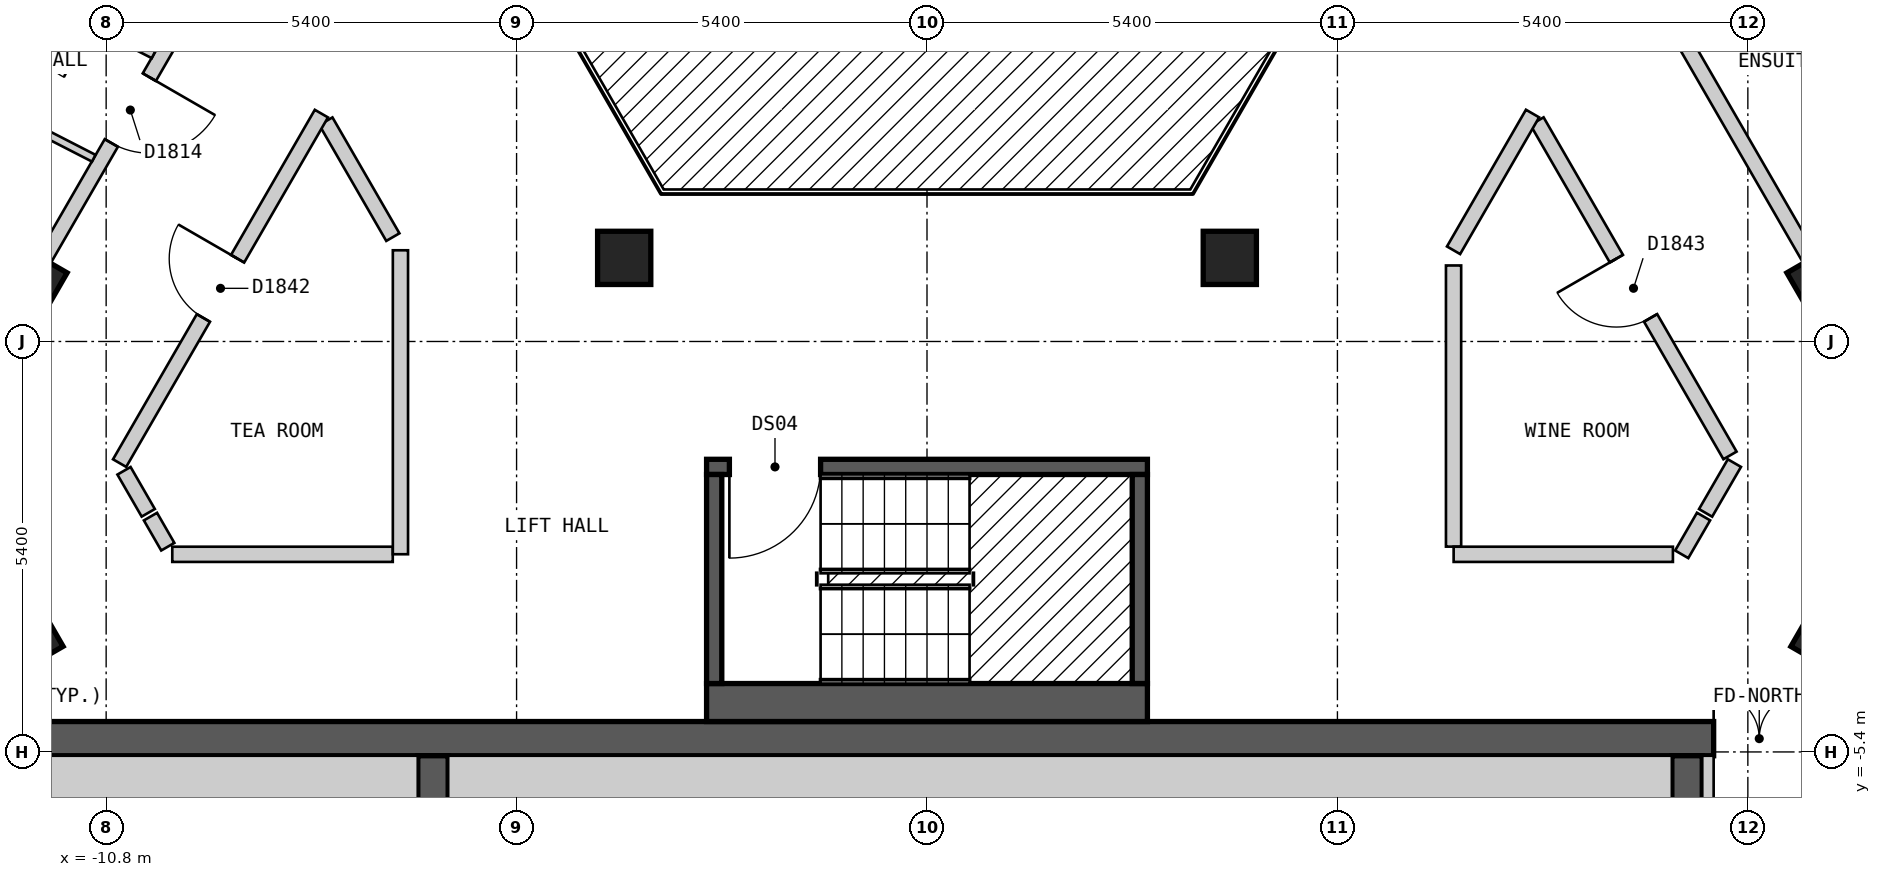
"""IFC4 building model, lengths in metres.
Left out: names, types, materials, properties, quantities, classifications, styles, units other than length and angle.
Written with IfcOpenShell. Run it as: python <this file> out.ifc"""

import sys

from ifc_helpers import new_model, si_unit, direction, frame, frame_2d, origin, origin_2d, place, context, subcontext, project, spatial, rectangle, extrude, element, fill, save


model = new_model("IFC4")
c1 = context("Model", 3, precision=1e-05, world=origin(), true_north=direction((0.0, 1.0)))
c2 = subcontext(c1, "Body", "Model", "MODEL_VIEW")
j1 = project(units=[si_unit("LENGTHUNIT", "METRE"), si_unit("PLANEANGLEUNIT", "RADIAN")], contexts=[c1])
p1 = place(None, origin())
s1 = spatial("IfcSite", under=j1, at=p1, CompositionType="ELEMENT")
p2 = place(p1, origin())
s2 = spatial("IfcBuilding", under=s1, at=p2, CompositionType="ELEMENT")
p3 = place(p2, frame((0.0, 0.0, 208.8)))
s3 = spatial("IfcBuildingStorey", under=s2, at=p3, CompositionType="ELEMENT", Elevation=208.8)
for number, where, z_axis, x_axis in (
    (1, (-11.845, -3.883, 0.0), (0.0, 0.0, 1.0), (0.5, -0.866, 0.0)),
    (2, (11.845, -3.884, 0.0), (0.0, 0.0, 1.0), (0.5, 0.866, 0.0)),
    (3, (11.792, 0.775, 0.0), (0.0, 0.0, 1.0), (-0.5, 0.866, 0.0)),
    (4, (3.984, 1.1, 0.0), (0.0, 0.0, 1.0), (1.0, 0.0, 0.0)),
    (5, (-3.984, 1.1, 0.0), (0.0, 0.0, 1.0), (1.0, 0.0, 0.0)),
    (6, (-11.792, 0.775, 0.0), (0.0, 0.0, 1.0), (-0.5, -0.866, 0.0)),
):
    element("IfcColumn", number, at=place(p3, frame(where, z_axis=z_axis, x_axis=x_axis)), inside=s3, PredefinedType="COLUMN", context=c2, shape_type="SweptSolid", body=[
        extrude(rectangle(XDim=0.7, YDim=0.7, at=origin_2d()), origin(), (0.0, 0.0, 1.0), 3.0),
    ])
p4 = place(p3, frame((-13.3, -5.225, 0.0), z_axis=(0.0, 0.0, 1.0), x_axis=(1.0, 0.0, 0.0)))
e7 = element("IfcWall", 7, at=p4, inside=s3, PredefinedType="SHEAR", context=c2, shape_type="SweptSolid", body=[
    extrude(rectangle(XDim=26.6, YDim=0.45, at=frame_2d((13.3, 0.0))), origin(), (0.0, 0.0, 1.0), 2.7),
])
p5 = place(p4, frame((23.65, 0.0, 0.0)))
e8 = element("IfcOpeningElement", 8, at=p5, cuts=e7, PredefinedType="OPENING", context=c2, shape_type="SweptSolid", body=[
    extrude(rectangle(XDim=1.2, YDim=2.1, at=frame_2d((0.6, 1.05))), frame((0.0, 0.235, 0.0), z_axis=(0.0, -1.0, 0.0), x_axis=(1.0, 0.0, 0.0)), (0.0, 0.0, 1.0), 0.47),
])
for number, where, z_axis, x_axis in (
    (9, (-6.5, -9.15, 0.0), (0.0, 0.0, 1.0), (0.0, 1.0, 0.0)),
    (10, (10.0, -9.15, 0.0), (0.0, 0.0, 1.0), (0.0, 1.0, 0.0)),
):
    element("IfcWall", number, at=place(p3, frame(where, z_axis=z_axis, x_axis=x_axis)), inside=s3, PredefinedType="SHEAR", context=c2, shape_type="SweptSolid", body=[
        extrude(rectangle(XDim=3.7, YDim=0.4, at=frame_2d((1.85, 0.0))), origin(), (0.0, 0.0, 1.0), 2.7),
    ])
p6 = place(p3, frame((-2.9, -4.75, 0.0), z_axis=(0.0, 0.0, 1.0), x_axis=(1.0, 0.0, 0.0)))
e11 = element("IfcWall", 11, at=p6, inside=s3, PredefinedType="SOLIDWALL", context=c2, shape_type="SweptSolid", body=[
    extrude(rectangle(XDim=5.8, YDim=0.5, at=frame_2d((2.9, 0.0))), origin(), (0.0, 0.0, 1.0), 2.7),
])
p7 = place(p3, frame((-2.9, -1.65, 0.0), z_axis=(0.0, 0.0, 1.0), x_axis=(1.0, 0.0, 0.0)))
e12 = element("IfcWall", 12, at=p7, inside=s3, PredefinedType="SOLIDWALL", context=c2, shape_type="SweptSolid", body=[
    extrude(rectangle(XDim=5.8, YDim=0.2, at=frame_2d((2.9, 0.0))), origin(), (0.0, 0.0, 1.0), 2.7),
])
p8 = place(p7, frame((0.3, 0.0, 0.0)))
e13 = element("IfcOpeningElement", 13, at=p8, cuts=e12, PredefinedType="OPENING", context=c2, shape_type="SweptSolid", body=[
    extrude(rectangle(XDim=1.2, YDim=2.1, at=frame_2d((0.6, 1.05))), frame((0.0, 0.11, 0.0), z_axis=(0.0, -1.0, 0.0), x_axis=(1.0, 0.0, 0.0)), (0.0, 0.0, 1.0), 0.22),
])
for number, where, z_axis, x_axis in (
    (14, (-2.8, -4.5, 0.0), (0.0, 0.0, 1.0), (0.0, 1.0, 0.0)),
    (15, (2.8, -4.5, 0.0), (0.0, 0.0, 1.0), (0.0, 1.0, 0.0)),
):
    element("IfcWall", number, at=place(p3, frame(where, z_axis=z_axis, x_axis=x_axis)), inside=s3, PredefinedType="SOLIDWALL", context=c2, shape_type="SweptSolid", body=[
        extrude(rectangle(XDim=2.75, YDim=0.2, at=frame_2d((1.375, 0.0))), origin(), (0.0, 0.0, 1.0), 2.7),
    ])
p9 = place(p3, frame((-7.909, 2.898, 0.0), z_axis=(0.0, 0.0, 1.0), x_axis=(0.50019444547, -0.865913111531, 0.0)))
e16 = element("IfcWall", 16, at=p9, inside=s3, PredefinedType="PARTITIONING", context=c2, shape_type="SweptSolid", body=[
    extrude(rectangle(XDim=1.761, YDim=0.2, at=frame_2d((0.88, 0.0))), origin(), (0.0, 0.0, 1.0), 2.7),
])
p10 = place(p3, frame((-10.565, -1.701, 0.0), z_axis=(0.0, 0.0, 1.0), x_axis=(0.499512735409, -0.866306543416, 0.0)))
e17 = element("IfcWall", 17, at=p10, inside=s3, PredefinedType="PARTITIONING", context=c2, shape_type="SweptSolid", body=[
    extrude(rectangle(XDim=0.638, YDim=0.2, at=frame_2d((0.319, 0.0))), origin(), (0.0, 0.0, 1.0), 2.7),
])
p11 = place(p3, frame((-10.217, -2.304, 0.0), z_axis=(0.0, 0.0, 1.0), x_axis=(0.499013081552, -0.866594452117, 0.0)))
e18 = element("IfcWall", 18, at=p11, inside=s3, PredefinedType="PARTITIONING", context=c2, shape_type="SweptSolid", body=[
    extrude(rectangle(XDim=0.457, YDim=0.2, at=frame_2d((0.229, 0.0))), origin(), (0.0, 0.0, 1.0), 2.7),
])
p12 = place(p3, frame((8.026, 2.899, 0.0), z_axis=(0.0, 0.0, 1.0), x_axis=(0.499986018985, -0.866033475577, 0.0)))
e19 = element("IfcWall", 19, at=p12, inside=s3, PredefinedType="PARTITIONING", context=c2, shape_type="SweptSolid", body=[
    extrude(rectangle(XDim=5.078, YDim=0.2, at=frame_2d((2.539, 0.0))), origin(), (0.0, 0.0, 1.0), 2.7),
])
p13 = place(p12, frame((2.089, 0.0, 0.0)))
e20 = element("IfcOpeningElement", 20, at=p13, cuts=e19, PredefinedType="OPENING", context=c2, shape_type="SweptSolid", body=[
    extrude(rectangle(XDim=0.9, YDim=2.1, at=frame_2d((0.45, 1.05))), frame((0.0, 0.11, 0.0), z_axis=(0.0, -1.0, 0.0), x_axis=(1.0, 0.0, 0.0)), (0.0, 0.0, 1.0), 0.22),
])
p14 = place(p3, frame((9.238, 5.2, 0.0), z_axis=(0.0, 0.0, 1.0), x_axis=(0.500025705601, -0.86601056214, 0.0)))
e21 = element("IfcWall", 21, at=p14, inside=s3, PredefinedType="PARTITIONING", context=c2, shape_type="SweptSolid", body=[
    extrude(rectangle(XDim=7.735, YDim=0.2, at=frame_2d((3.868, 0.0))), origin(), (0.0, 0.0, 1.0), 2.7),
])
p15 = place(p3, frame((6.928, 1.0, 0.0), z_axis=(0.0, 0.0, 1.0), x_axis=(0.0, -1.0, 0.0)))
e22 = element("IfcWall", 22, at=p15, inside=s3, PredefinedType="PARTITIONING", context=c2, shape_type="SweptSolid", body=[
    extrude(rectangle(XDim=3.699, YDim=0.2, at=frame_2d((1.85, 0.0))), origin(), (0.0, 0.0, 1.0), 2.7),
])
p16 = place(p3, frame((-9.93, -2.8, 0.0), z_axis=(0.0, 0.0, 1.0), x_axis=(1.0, 0.0, 0.0)))
e23 = element("IfcWall", 23, at=p16, inside=s3, PredefinedType="PARTITIONING", context=c2, shape_type="SweptSolid", body=[
    extrude(rectangle(XDim=2.901, YDim=0.2, at=frame_2d((1.45, 0.0))), origin(), (0.0, 0.0, 1.0), 2.7),
])
p17 = place(p3, frame((6.929, -2.8, 0.0), z_axis=(0.0, 0.0, 1.0), x_axis=(1.0, 0.0, 0.0)))
e24 = element("IfcWall", 24, at=p17, inside=s3, PredefinedType="PARTITIONING", context=c2, shape_type="SweptSolid", body=[
    extrude(rectangle(XDim=2.885, YDim=0.2, at=frame_2d((1.442, 0.0))), origin(), (0.0, 0.0, 1.0), 2.7),
])
p18 = place(p3, frame((6.928, 1.2, 0.0), z_axis=(0.0, 0.0, 1.0), x_axis=(0.500132712588, 0.865948768577, 0.0)))
e25 = element("IfcWall", 25, at=p18, inside=s3, PredefinedType="PARTITIONING", context=c2, shape_type="SweptSolid", body=[
    extrude(rectangle(XDim=2.078, YDim=0.2, at=frame_2d((1.039, 0.0))), origin(), (0.0, 0.0, 1.0), 2.7),
])
p19 = place(p3, frame((9.93, -2.8, 0.0), z_axis=(0.0, 0.0, 1.0), x_axis=(0.500164219654, 0.865930570761, 0.0)))
e26 = element("IfcWall", 26, at=p19, inside=s3, PredefinedType="PARTITIONING", context=c2, shape_type="SweptSolid", body=[
    extrude(rectangle(XDim=0.574, YDim=0.2, at=frame_2d((0.287, 0.0))), origin(), (0.0, 0.0, 1.0), 2.7),
])
p20 = place(p3, frame((10.244, -2.255, 0.0), z_axis=(0.0, 0.0, 1.0), x_axis=(0.50109986513, 0.865389464442, 0.0)))
e27 = element("IfcWall", 27, at=p20, inside=s3, PredefinedType="PARTITIONING", context=c2, shape_type="SweptSolid", body=[
    extrude(rectangle(XDim=0.757, YDim=0.2, at=frame_2d((0.378, 0.0))), origin(), (0.0, 0.0, 1.0), 2.7),
])
p21 = place(p3, frame((-10.623, -1.6, 0.0), z_axis=(0.0, 0.0, 1.0), x_axis=(0.500040865889, 0.866001808567, 0.0)))
e28 = element("IfcWall", 28, at=p21, inside=s3, PredefinedType="PARTITIONING", context=c2, shape_type="SweptSolid", body=[
    extrude(rectangle(XDim=5.31, YDim=0.2, at=frame_2d((2.655, 0.0))), origin(), (0.0, 0.0, 1.0), 2.7),
])
p22 = place(p21, frame((2.205, 0.0, 0.0)))
e29 = element("IfcOpeningElement", 29, at=p22, cuts=e28, PredefinedType="OPENING", context=c2, shape_type="SweptSolid", body=[
    extrude(rectangle(XDim=0.9, YDim=2.1, at=frame_2d((0.45, 1.05))), frame((0.0, 0.11, 0.0), z_axis=(0.0, -1.0, 0.0), x_axis=(1.0, 0.0, 0.0)), (0.0, 0.0, 1.0), 0.22),
])
p23 = place(p3, frame((-13.106, -1.5, 0.0), z_axis=(0.0, 0.0, 1.0), x_axis=(0.500025705601, 0.86601056214, 0.0)))
e30 = element("IfcWall", 30, at=p23, inside=s3, PredefinedType="PARTITIONING", context=c2, shape_type="SweptSolid", body=[
    extrude(rectangle(XDim=7.735, YDim=0.2, at=frame_2d((3.868, 0.0))), origin(), (0.0, 0.0, 1.0), 2.7),
])
p24 = place(p23, frame((4.748, 0.0, 0.0)))
e31 = element("IfcOpeningElement", 31, at=p24, cuts=e30, PredefinedType="OPENING", context=c2, shape_type="SweptSolid", body=[
    extrude(rectangle(XDim=1.0, YDim=2.1, at=frame_2d((0.5, 1.05))), frame((0.0, 0.11, 0.0), z_axis=(0.0, -1.0, 0.0), x_axis=(1.0, 0.0, 0.0)), (0.0, 0.0, 1.0), 0.22),
])
p25 = place(p23, frame((0.03, 0.0, 0.0)))
e32 = element("IfcOpeningElement", 32, at=p25, cuts=e30, PredefinedType="OPENING", context=c2, shape_type="SweptSolid", body=[
    extrude(rectangle(XDim=0.8, YDim=2.1, at=frame_2d((0.4, 1.05))), frame((0.0, 0.11, 0.0), z_axis=(0.0, -1.0, 0.0), x_axis=(1.0, 0.0, 0.0)), (0.0, 0.0, 1.0), 0.22),
])
p26 = place(p3, frame((-6.928, -2.799, 0.0), z_axis=(0.0, 0.0, 1.0), x_axis=(0.0, 1.0, 0.0)))
e33 = element("IfcWall", 33, at=p26, inside=s3, PredefinedType="PARTITIONING", context=c2, shape_type="SweptSolid", body=[
    extrude(rectangle(XDim=3.999, YDim=0.2, at=frame_2d((2.0, 0.0))), origin(), (0.0, 0.0, 1.0), 2.7),
])
p27 = place(p3, frame((-12.562, 4.995, 0.0), z_axis=(0.0, 0.0, 1.0), x_axis=(0.889807979554, -0.456335139478, 0.0)))
e34 = element("IfcWall", 34, at=p27, inside=s3, PredefinedType="PARTITIONING", context=c2, shape_type="SweptSolid", body=[
    extrude(rectangle(XDim=2.68, YDim=0.1, at=frame_2d((1.34, 0.0))), origin(), (0.0, 0.0, 1.0), 2.7),
])
p28 = place(p27, frame((0.965, 0.0, 0.0)))
e35 = element("IfcOpeningElement", 35, at=p28, cuts=e34, PredefinedType="OPENING", context=c2, shape_type="SweptSolid", body=[
    extrude(rectangle(XDim=0.8, YDim=2.1, at=frame_2d((0.4, 1.05))), frame((0.0, 0.06, 0.0), z_axis=(0.0, -1.0, 0.0), x_axis=(1.0, 0.0, 0.0)), (0.0, 0.0, 1.0), 0.12),
])
p29 = place(p3, frame((-13.277, 3.598, 0.0), z_axis=(0.0, 0.0, 1.0), x_axis=(0.889780322893, -0.456389063182, 0.0)))
e36 = element("IfcWall", 36, at=p29, inside=s3, PredefinedType="PARTITIONING", context=c2, shape_type="SweptSolid", body=[
    extrude(rectangle(XDim=2.601, YDim=0.1, at=frame_2d((1.3, 0.0))), origin(), (0.0, 0.0, 1.0), 2.7),
])
p30 = place(p29, frame((0.875, 0.0, 0.0)))
e37 = element("IfcOpeningElement", 37, at=p30, cuts=e36, PredefinedType="OPENING", context=c2, shape_type="SweptSolid", body=[
    extrude(rectangle(XDim=0.9, YDim=2.1, at=frame_2d((0.45, 1.05))), frame((0.0, 0.06, 0.0), z_axis=(0.0, -1.0, 0.0), x_axis=(1.0, 0.0, 0.0)), (0.0, 0.0, 1.0), 0.12),
])
p31 = place(p3, frame((-12.1, -5.825, 0.0), z_axis=(0.0, 0.0, 1.0), x_axis=(1.0, 0.0, 0.0)))
e38 = element("IfcWall", 38, at=p31, inside=s3, PredefinedType="SOLIDWALL", context=c2, shape_type="SweptSolid", body=[
    extrude(rectangle(XDim=5.4, YDim=0.75, at=frame_2d((2.7, 0.0))), origin(), (0.0, 0.0, 1.0), 2.7),
])
p32 = place(p3, frame((-6.3, -5.825, 0.0), z_axis=(0.0, 0.0, 1.0), x_axis=(1.0, 0.0, 0.0)))
e39 = element("IfcWall", 39, at=p32, inside=s3, PredefinedType="SOLIDWALL", context=c2, shape_type="SweptSolid", body=[
    extrude(rectangle(XDim=16.1, YDim=0.75, at=frame_2d((8.05, 0.0))), origin(), (0.0, 0.0, 1.0), 2.7),
])
p33 = place(p3, frame((10.275, -6.2, 0.0), z_axis=(0.0, 0.0, 1.0), x_axis=(0.0, 1.0, 0.0)))
e40 = element("IfcWall", 40, at=p33, inside=s3, PredefinedType="PARTITIONING", context=c2, shape_type="SweptSolid", body=[
    extrude(rectangle(XDim=0.75, YDim=0.15, at=frame_2d((0.375, 0.0))), origin(), (0.0, 0.0, 1.0), 2.7),
])
p34 = place(p8, origin())
e41 = element("IfcDoor", 41, at=p34, inside=s3, OperationType="SINGLE_SWING_LEFT", PredefinedType="DOOR", context=c2, shape_type="SweptSolid", body=[
    extrude(rectangle(XDim=1.2, YDim=2.1, at=frame_2d((0.6, 1.05))), frame((0.0, 0.025, 0.0), z_axis=(0.0, -1.0, 0.0), x_axis=(1.0, 0.0, 0.0)), (0.0, 0.0, 1.0), 0.05),
])
fill(e13, e41)
p35 = place(p24, origin())
e42 = element("IfcDoor", 42, at=p35, inside=s3, OperationType="SINGLE_SWING_RIGHT", PredefinedType="DOOR", context=c2, shape_type="SweptSolid", body=[
    extrude(rectangle(XDim=1.0, YDim=2.1, at=frame_2d((0.5, 1.05))), frame((0.0, 0.025, 0.0), z_axis=(0.0, -1.0, 0.0), x_axis=(1.0, 0.0, 0.0)), (0.0, 0.0, 1.0), 0.05),
])
fill(e31, e42)
p36 = place(p22, origin())
e43 = element("IfcDoor", 43, at=p36, inside=s3, OperationType="SINGLE_SWING_RIGHT", PredefinedType="DOOR", context=c2, shape_type="SweptSolid", body=[
    extrude(rectangle(XDim=0.9, YDim=2.1, at=frame_2d((0.45, 1.05))), frame((0.0, 0.025, 0.0), z_axis=(0.0, -1.0, 0.0), x_axis=(1.0, 0.0, 0.0)), (0.0, 0.0, 1.0), 0.05),
])
fill(e29, e43)
p37 = place(p13, origin())
e44 = element("IfcDoor", 44, at=p37, inside=s3, OperationType="SINGLE_SWING_LEFT", PredefinedType="DOOR", context=c2, shape_type="SweptSolid", body=[
    extrude(rectangle(XDim=0.9, YDim=2.1, at=frame_2d((0.45, 1.05))), frame((0.0, 0.025, 0.0), z_axis=(0.0, -1.0, 0.0), x_axis=(1.0, 0.0, 0.0)), (0.0, 0.0, 1.0), 0.05),
])
fill(e20, e44)
p38 = place(p5, origin())
e45 = element("IfcDoor", 45, at=p38, inside=s3, OperationType="DOUBLE_DOOR_SINGLE_SWING", PredefinedType="DOOR", context=c2, shape_type="SweptSolid", body=[
    extrude(rectangle(XDim=1.2, YDim=2.1, at=frame_2d((0.6, 1.05))), frame((0.0, 0.025, 0.0), z_axis=(0.0, -1.0, 0.0), x_axis=(1.0, 0.0, 0.0)), (0.0, 0.0, 1.0), 0.05),
])
fill(e8, e45)
save(model, sys.argv[1])
